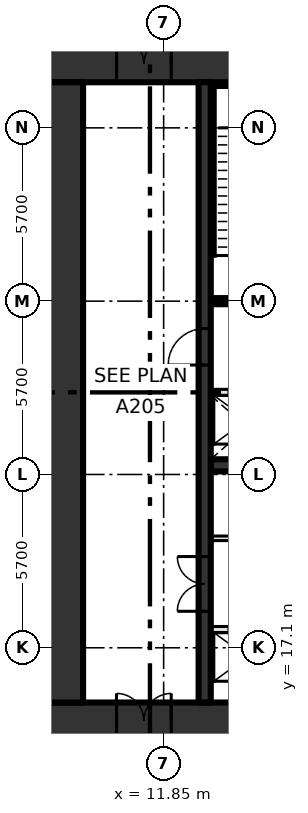
"""IFC4 building model, lengths in metres.
Left out: names, types, materials, properties, quantities, classifications, styles, units other than length and angle.
Written with IfcOpenShell. Run it as: python <this file> out.ifc"""

import sys

from ifc_helpers import new_model, si_unit, direction, frame, frame_2d, origin, place, context, subcontext, project, spatial, rectangle, extrude, element, fill, save


model = new_model("IFC4")
c1 = context("Model", 3, precision=1e-05, world=origin(), true_north=direction((0.0, 1.0)))
c2 = subcontext(c1, "Body", "Model", "MODEL_VIEW")
j1 = project(units=[si_unit("LENGTHUNIT", "METRE"), si_unit("PLANEANGLEUNIT", "RADIAN")], contexts=[c1])
p1 = place(None, origin())
s1 = spatial("IfcSite", under=j1, at=p1, CompositionType="ELEMENT")
p2 = place(p1, origin())
s2 = spatial("IfcBuilding", under=s1, at=p2, CompositionType="ELEMENT")
p3 = place(p2, frame((0.0, 0.0, 12.6)))
s3 = spatial("IfcBuildingStorey", under=s2, at=p3, CompositionType="ELEMENT", Elevation=12.6)
p4 = place(p3, frame((8.0, 14.7, -0.45), z_axis=(0.0, 0.0, 1.0), x_axis=(1.0, 0.0, 0.0)))
e1 = element("IfcWall", 1, at=p4, inside=s3, PredefinedType="SHEAR", context=c2, shape_type="SweptSolid", body=[
    extrude(rectangle(XDim=22.8, YDim=1.2, at=frame_2d((11.4, 0.0))), origin(), (0.0, 0.0, 1.0), 6.0),
])
p5 = place(p4, frame((2.3, 0.0, 0.45)))
e2 = element("IfcOpeningElement", 2, at=p5, cuts=e1, PredefinedType="OPENING", context=c2, shape_type="SweptSolid", body=[
    extrude(rectangle(XDim=1.8, YDim=2.1, at=frame_2d((0.9, 1.05))), frame((0.0, 0.61, 0.0), z_axis=(0.0, -1.0, 0.0), x_axis=(1.0, 0.0, 0.0)), (0.0, 0.0, 1.0), 1.22),
])
p6 = place(p3, frame((8.0, 36.3, -0.45), z_axis=(0.0, 0.0, 1.0), x_axis=(1.0, 0.0, 0.0)))
e3 = element("IfcWall", 3, at=p6, inside=s3, PredefinedType="SHEAR", context=c2, shape_type="SweptSolid", body=[
    extrude(rectangle(XDim=22.8, YDim=1.2, at=frame_2d((11.4, 0.0))), origin(), (0.0, 0.0, 1.0), 6.0),
])
p7 = place(p6, frame((2.3, 0.0, 0.45)))
e4 = element("IfcOpeningElement", 4, at=p7, cuts=e3, PredefinedType="OPENING", context=c2, shape_type="SweptSolid", body=[
    extrude(rectangle(XDim=1.8, YDim=2.1, at=frame_2d((0.9, 1.05))), frame((0.0, 0.61, 0.0), z_axis=(0.0, -1.0, 0.0), x_axis=(1.0, 0.0, 0.0)), (0.0, 0.0, 1.0), 1.22),
])
p8 = place(p3, frame((8.6, 15.3, -0.45), z_axis=(0.0, 0.0, 1.0), x_axis=(0.0, 1.0, 0.0)))
e5 = element("IfcWall", 5, at=p8, inside=s3, PredefinedType="SHEAR", context=c2, shape_type="SweptSolid", body=[
    extrude(rectangle(XDim=20.4, YDim=1.2, at=frame_2d((10.2, 0.0))), origin(), (0.0, 0.0, 1.0), 6.0),
])
p9 = place(p3, frame((13.4, 17.7, 0.0), z_axis=(0.0, 0.0, 1.0), x_axis=(1.0, 0.0, 0.0)))
e6 = element("IfcWall", 6, at=p9, inside=s3, PredefinedType="SOLIDWALL", context=c2, shape_type="SweptSolid", body=[
    extrude(rectangle(XDim=13.4, YDim=0.2, at=frame_2d((6.7, 0.0))), origin(), (0.0, 0.0, 1.0), 5.55),
])
p10 = place(p9, frame((0.6, 0.0, 0.0)))
e7 = element("IfcOpeningElement", 7, at=p10, cuts=e6, PredefinedType="OPENING", context=c2, shape_type="SweptSolid", body=[
    extrude(rectangle(XDim=1.1, YDim=2.1, at=frame_2d((0.55, 1.05))), frame((0.0, 0.11, 0.0), z_axis=(0.0, -1.0, 0.0), x_axis=(1.0, 0.0, 0.0)), (0.0, 0.0, 1.0), 0.22),
])
p11 = place(p9, frame((3.3, 0.0, 0.0)))
e8 = element("IfcOpeningElement", 8, at=p11, cuts=e6, PredefinedType="OPENING", context=c2, shape_type="SweptSolid", body=[
    extrude(rectangle(XDim=1.1, YDim=2.1, at=frame_2d((0.55, 1.05))), frame((0.0, 0.11, 0.0), z_axis=(0.0, -1.0, 0.0), x_axis=(1.0, 0.0, 0.0)), (0.0, 0.0, 1.0), 0.22),
])
p12 = place(p9, frame((6.0, 0.0, 0.0)))
e9 = element("IfcOpeningElement", 9, at=p12, cuts=e6, PredefinedType="OPENING", context=c2, shape_type="SweptSolid", body=[
    extrude(rectangle(XDim=1.1, YDim=2.1, at=frame_2d((0.55, 1.05))), frame((0.0, 0.11, 0.0), z_axis=(0.0, -1.0, 0.0), x_axis=(1.0, 0.0, 0.0)), (0.0, 0.0, 1.0), 0.22),
])
p13 = place(p9, frame((8.7, 0.0, 0.0)))
e10 = element("IfcOpeningElement", 10, at=p13, cuts=e6, PredefinedType="OPENING", context=c2, shape_type="SweptSolid", body=[
    extrude(rectangle(XDim=1.1, YDim=2.1, at=frame_2d((0.55, 1.05))), frame((0.0, 0.11, 0.0), z_axis=(0.0, -1.0, 0.0), x_axis=(1.0, 0.0, 0.0)), (0.0, 0.0, 1.0), 0.22),
])
p14 = place(p9, frame((11.4, 0.0, 0.0)))
e11 = element("IfcOpeningElement", 11, at=p14, cuts=e6, PredefinedType="OPENING", context=c2, shape_type="SweptSolid", body=[
    extrude(rectangle(XDim=1.1, YDim=2.1, at=frame_2d((0.55, 1.05))), frame((0.0, 0.11, 0.0), z_axis=(0.0, -1.0, 0.0), x_axis=(1.0, 0.0, 0.0)), (0.0, 0.0, 1.0), 0.22),
])
p15 = place(p3, frame((13.4, 20.7, 0.0), z_axis=(0.0, 0.0, 1.0), x_axis=(1.0, 0.0, 0.0)))
e12 = element("IfcWall", 12, at=p15, inside=s3, PredefinedType="PARTITIONING", context=c2, shape_type="SweptSolid", body=[
    extrude(rectangle(XDim=13.4, YDim=0.15, at=frame_2d((6.7, 0.0))), origin(), (0.0, 0.0, 1.0), 5.55),
])
p16 = place(p15, frame((0.7, 0.0, 0.0)))
e13 = element("IfcOpeningElement", 13, at=p16, cuts=e12, PredefinedType="OPENING", context=c2, shape_type="SweptSolid", body=[
    extrude(rectangle(XDim=0.9, YDim=2.1, at=frame_2d((0.45, 1.05))), frame((0.0, 0.085, 0.0), z_axis=(0.0, -1.0, 0.0), x_axis=(1.0, 0.0, 0.0)), (0.0, 0.0, 1.0), 0.17),
])
p17 = place(p15, frame((7.45, 0.0, 0.0)))
e14 = element("IfcOpeningElement", 14, at=p17, cuts=e12, PredefinedType="OPENING", context=c2, shape_type="SweptSolid", body=[
    extrude(rectangle(XDim=0.9, YDim=2.1, at=frame_2d((0.45, 1.05))), frame((0.0, 0.085, 0.0), z_axis=(0.0, -1.0, 0.0), x_axis=(1.0, 0.0, 0.0)), (0.0, 0.0, 1.0), 0.17),
])
p18 = place(p3, frame((13.4, 23.1, 0.0), z_axis=(0.0, 0.0, 1.0), x_axis=(1.0, 0.0, 0.0)))
e15 = element("IfcWall", 15, at=p18, inside=s3, PredefinedType="SHEAR", context=c2, shape_type="SweptSolid", body=[
    extrude(rectangle(XDim=16.2, YDim=0.4, at=frame_2d((8.1, 0.0))), origin(), (0.0, 0.0, 1.0), 5.55),
])
p19 = place(p3, frame((13.4, 25.5, 0.0), z_axis=(0.0, 0.0, 1.0), x_axis=(1.0, 0.0, 0.0)))
e16 = element("IfcWall", 16, at=p19, inside=s3, PredefinedType="SOLIDWALL", context=c2, shape_type="SweptSolid", body=[
    extrude(rectangle(XDim=16.2, YDim=0.2, at=frame_2d((8.1, 0.0))), origin(), (0.0, 0.0, 1.0), 5.55),
])
p20 = place(p19, frame((0.6, 0.0, 0.0)))
e17 = element("IfcOpeningElement", 17, at=p20, cuts=e16, PredefinedType="OPENING", context=c2, shape_type="SweptSolid", body=[
    extrude(rectangle(XDim=1.1, YDim=2.1, at=frame_2d((0.55, 1.05))), frame((0.0, 0.11, 0.0), z_axis=(0.0, -1.0, 0.0), x_axis=(1.0, 0.0, 0.0)), (0.0, 0.0, 1.0), 0.22),
])
p21 = place(p19, frame((3.3, 0.0, 0.0)))
e18 = element("IfcOpeningElement", 18, at=p21, cuts=e16, PredefinedType="OPENING", context=c2, shape_type="SweptSolid", body=[
    extrude(rectangle(XDim=1.1, YDim=2.1, at=frame_2d((0.55, 1.05))), frame((0.0, 0.11, 0.0), z_axis=(0.0, -1.0, 0.0), x_axis=(1.0, 0.0, 0.0)), (0.0, 0.0, 1.0), 0.22),
])
p22 = place(p19, frame((6.0, 0.0, 0.0)))
e19 = element("IfcOpeningElement", 19, at=p22, cuts=e16, PredefinedType="OPENING", context=c2, shape_type="SweptSolid", body=[
    extrude(rectangle(XDim=1.1, YDim=2.1, at=frame_2d((0.55, 1.05))), frame((0.0, 0.11, 0.0), z_axis=(0.0, -1.0, 0.0), x_axis=(1.0, 0.0, 0.0)), (0.0, 0.0, 1.0), 0.22),
])
p23 = place(p19, frame((8.7, 0.0, 0.0)))
e20 = element("IfcOpeningElement", 20, at=p23, cuts=e16, PredefinedType="OPENING", context=c2, shape_type="SweptSolid", body=[
    extrude(rectangle(XDim=1.1, YDim=2.1, at=frame_2d((0.55, 1.05))), frame((0.0, 0.11, 0.0), z_axis=(0.0, -1.0, 0.0), x_axis=(1.0, 0.0, 0.0)), (0.0, 0.0, 1.0), 0.22),
])
p24 = place(p3, frame((13.4, 28.5, 0.0), z_axis=(0.0, 0.0, 1.0), x_axis=(1.0, 0.0, 0.0)))
e21 = element("IfcWall", 21, at=p24, inside=s3, PredefinedType="SOLIDWALL", context=c2, shape_type="SweptSolid", body=[
    extrude(rectangle(XDim=6.7, YDim=0.2, at=frame_2d((3.35, 0.0))), origin(), (0.0, 0.0, 1.0), 5.55),
])
p25 = place(p24, frame((0.9, 0.0, 0.0)))
e22 = element("IfcOpeningElement", 22, at=p25, cuts=e21, PredefinedType="OPENING", context=c2, shape_type="SweptSolid", body=[
    extrude(rectangle(XDim=1.2, YDim=2.1, at=frame_2d((0.6, 1.05))), frame((0.0, 0.11, 0.0), z_axis=(0.0, -1.0, 0.0), x_axis=(1.0, 0.0, 0.0)), (0.0, 0.0, 1.0), 0.22),
])
p26 = place(p24, frame((3.7, 0.0, 0.0)))
e23 = element("IfcOpeningElement", 23, at=p26, cuts=e21, PredefinedType="OPENING", context=c2, shape_type="SweptSolid", body=[
    extrude(rectangle(XDim=1.1, YDim=2.1, at=frame_2d((0.55, 1.05))), frame((0.0, 0.11, 0.0), z_axis=(0.0, -1.0, 0.0), x_axis=(1.0, 0.0, 0.0)), (0.0, 0.0, 1.0), 0.22),
])
p27 = place(p3, frame((13.2, 15.3, 0.0), z_axis=(0.0, 0.0, 1.0), x_axis=(0.0, 1.0, 0.0)))
e24 = element("IfcWall", 24, at=p27, inside=s3, PredefinedType="SHEAR", context=c2, shape_type="SweptSolid", body=[
    extrude(rectangle(XDim=20.4, YDim=0.4, at=frame_2d((10.2, 0.0))), origin(), (0.0, 0.0, 1.0), 5.55),
])
p28 = place(p27, frame((3.0, 0.0, 0.0)))
e25 = element("IfcOpeningElement", 25, at=p28, cuts=e24, PredefinedType="OPENING", context=c2, shape_type="SweptSolid", body=[
    extrude(rectangle(XDim=1.8, YDim=2.1, at=frame_2d((0.9, 1.05))), frame((0.0, 0.21, 0.0), z_axis=(0.0, -1.0, 0.0), x_axis=(1.0, 0.0, 0.0)), (0.0, 0.0, 1.0), 0.42),
])
p29 = place(p27, frame((11.1, 0.0, 0.0)))
e26 = element("IfcOpeningElement", 26, at=p29, cuts=e24, PredefinedType="OPENING", context=c2, shape_type="SweptSolid", body=[
    extrude(rectangle(XDim=1.2, YDim=2.1, at=frame_2d((0.6, 1.05))), frame((0.0, 0.21, 0.0), z_axis=(0.0, -1.0, 0.0), x_axis=(1.0, 0.0, 0.0)), (0.0, 0.0, 1.0), 0.42),
])
p30 = place(p28, origin())
e27 = element("IfcDoor", 27, at=p30, inside=s3, OperationType="DOUBLE_DOOR_SINGLE_SWING", PredefinedType="DOOR", context=c2, shape_type="SweptSolid", body=[
    extrude(rectangle(XDim=1.8, YDim=2.1, at=frame_2d((0.9, 1.05))), frame((0.0, 0.025, 0.0), z_axis=(0.0, -1.0, 0.0), x_axis=(1.0, 0.0, 0.0)), (0.0, 0.0, 1.0), 0.05),
])
fill(e25, e27)
p31 = place(p29, origin())
e28 = element("IfcDoor", 28, at=p31, inside=s3, OperationType="SINGLE_SWING_LEFT", PredefinedType="DOOR", context=c2, shape_type="SweptSolid", body=[
    extrude(rectangle(XDim=1.2, YDim=2.1, at=frame_2d((0.6, 1.05))), frame((0.0, 0.025, 0.0), z_axis=(0.0, -1.0, 0.0), x_axis=(1.0, 0.0, 0.0)), (0.0, 0.0, 1.0), 0.05),
])
fill(e26, e28)
p32 = place(p7, origin())
e29 = element("IfcDoor", 29, at=p32, inside=s3, OperationType="DOUBLE_DOOR_SINGLE_SWING", PredefinedType="DOOR", context=c2, shape_type="SweptSolid", body=[
    extrude(rectangle(XDim=1.8, YDim=2.1, at=frame_2d((0.9, 1.05))), frame((0.0, 0.025, 0.0), z_axis=(0.0, -1.0, 0.0), x_axis=(1.0, 0.0, 0.0)), (0.0, 0.0, 1.0), 0.05),
])
fill(e4, e29)
p33 = place(p5, origin())
e30 = element("IfcDoor", 30, at=p33, inside=s3, OperationType="DOUBLE_DOOR_SINGLE_SWING", PredefinedType="DOOR", context=c2, shape_type="SweptSolid", body=[
    extrude(rectangle(XDim=1.8, YDim=2.1, at=frame_2d((0.9, 1.05))), frame((0.0, 0.025, 0.0), z_axis=(0.0, -1.0, 0.0), x_axis=(1.0, 0.0, 0.0)), (0.0, 0.0, 1.0), 0.05),
])
fill(e2, e30)
save(model, sys.argv[1])
